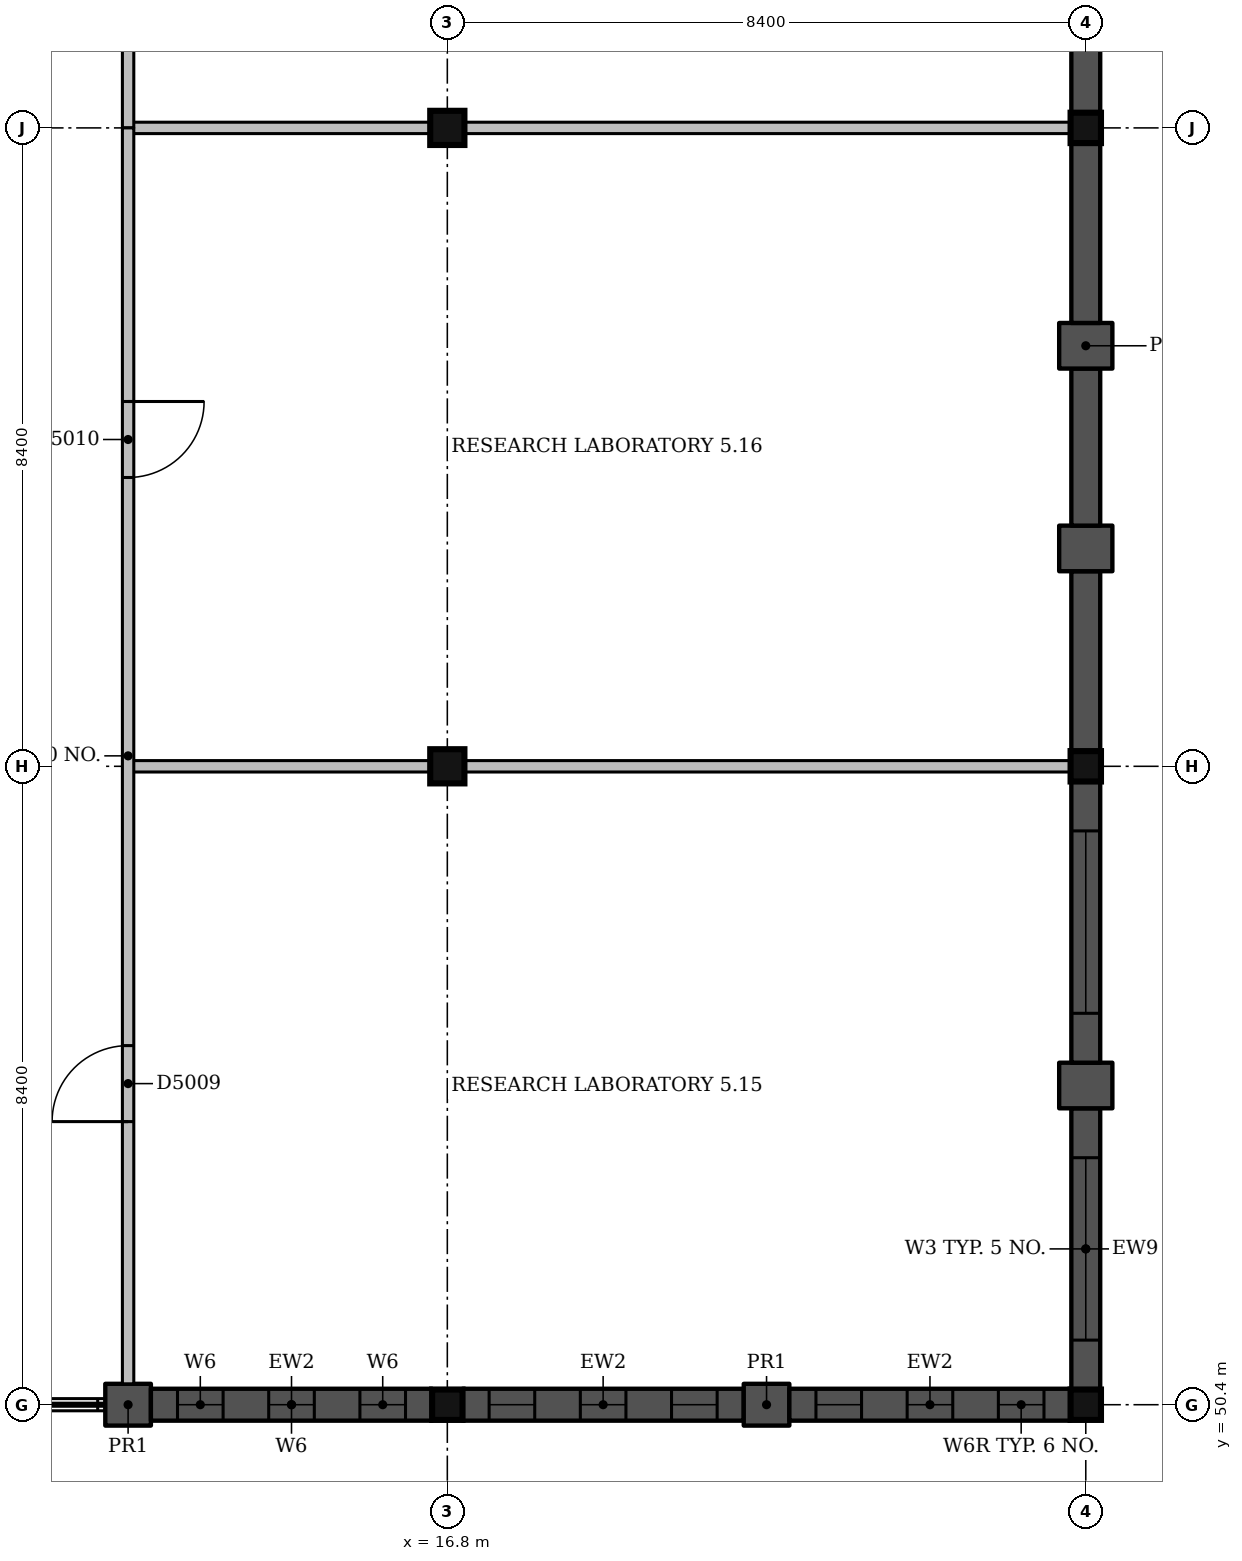
"""IFC4 building model, lengths in metres.
Left out: names, types, materials, properties, quantities, classifications, styles, units other than length and angle.
Written with IfcOpenShell. Run it as: python <this file> out.ifc"""

import sys

from ifc_helpers import new_model, si_unit, direction, frame, frame_2d, origin, origin_2d, place, context, subcontext, project, spatial, rectangle, extrude, element, fill, save


model = new_model("IFC4")
c1 = context("Model", 3, precision=1e-05, world=origin(), true_north=direction((0.0, 1.0)))
c2 = subcontext(c1, "Body", "Model", "MODEL_VIEW")
j1 = project(units=[si_unit("LENGTHUNIT", "METRE"), si_unit("PLANEANGLEUNIT", "RADIAN")], contexts=[c1])
p1 = place(None, origin())
s1 = spatial("IfcSite", under=j1, at=p1, CompositionType="ELEMENT")
p2 = place(p1, origin())
s2 = spatial("IfcBuilding", under=s1, at=p2, CompositionType="ELEMENT")
p3 = place(p2, frame((0.0, 0.0, 22.5)))
s3 = spatial("IfcBuildingStorey", under=s2, at=p3, CompositionType="ELEMENT", Elevation=22.5)
p4 = place(p3, frame((16.8, 50.4, 0.0), z_axis=(0.0, 0.0, 1.0), x_axis=(1.0, 0.0, 0.0)))
e1 = element("IfcColumn", 1, at=p4, inside=s3, PredefinedType="COLUMN", context=c2, shape_type="SweptSolid", body=[
    extrude(rectangle(XDim=0.4, YDim=0.4, at=origin_2d()), origin(), (0.0, 0.0, 1.0), 4.5),
])
for number, where, z_axis, x_axis in (
    (2, (16.8, 58.8, 0.0), (0.0, 0.0, 1.0), (1.0, 0.0, 0.0)),
    (3, (16.8, 67.2, 0.0), (0.0, 0.0, 1.0), (1.0, 0.0, 0.0)),
):
    element("IfcColumn", number, at=place(p3, frame(where, z_axis=z_axis, x_axis=x_axis)), inside=s3, PredefinedType="COLUMN", context=c2, shape_type="SweptSolid", body=[
        extrude(rectangle(XDim=0.45, YDim=0.45, at=origin_2d()), origin(), (0.0, 0.0, 1.0), 4.5),
    ])
for number, where, z_axis, x_axis in (
    (4, (25.2, 50.4, 0.0), (0.0, 0.0, 1.0), (1.0, 0.0, 0.0)),
    (5, (25.2, 58.8, 0.0), (0.0, 0.0, 1.0), (1.0, 0.0, 0.0)),
    (6, (25.2, 67.2, 0.0), (0.0, 0.0, 1.0), (1.0, 0.0, 0.0)),
):
    element("IfcColumn", number, at=place(p3, frame(where, z_axis=z_axis, x_axis=x_axis)), inside=s3, PredefinedType="COLUMN", context=c2, shape_type="SweptSolid", body=[
        extrude(rectangle(XDim=0.4, YDim=0.4, at=origin_2d()), origin(), (0.0, 0.0, 1.0), 4.5),
    ])
p5 = place(p3, frame((25.2, 50.6, 0.0), z_axis=(0.0, 0.0, 1.0), x_axis=(0.0, 1.0, 0.0)))
e7 = element("IfcWall", 7, at=p5, inside=s3, PredefinedType="SOLIDWALL", context=c2, shape_type="SweptSolid", body=[
    extrude(rectangle(XDim=3.7, YDim=0.38, at=frame_2d((1.85, 0.0))), origin(), (0.0, 0.0, 1.0), 4.2),
])
p6 = place(p5, frame((0.65, 0.0, 1.2)))
e8 = element("IfcOpeningElement", 8, at=p6, cuts=e7, PredefinedType="OPENING", context=c2, shape_type="SweptSolid", body=[
    extrude(rectangle(XDim=2.4, YDim=1.5, at=frame_2d((1.2, 0.75))), frame((0.0, 0.2, 0.0), z_axis=(0.0, -1.0, 0.0), x_axis=(1.0, 0.0, 0.0)), (0.0, 0.0, 1.0), 0.4),
])
p7 = place(p3, frame((25.2, 54.3, 0.0), z_axis=(0.0, 0.0, 1.0), x_axis=(0.0, 1.0, 0.0)))
e9 = element("IfcWall", 9, at=p7, inside=s3, PredefinedType="SOLIDWALL", context=c2, shape_type="SweptSolid", body=[
    extrude(rectangle(XDim=0.6, YDim=0.7, at=frame_2d((0.3, 0.0))), origin(), (0.0, 0.0, 1.0), 4.2),
])
p8 = place(p3, frame((25.2, 54.9, 0.0), z_axis=(0.0, 0.0, 1.0), x_axis=(0.0, 1.0, 0.0)))
e10 = element("IfcWall", 10, at=p8, inside=s3, PredefinedType="SOLIDWALL", context=c2, shape_type="SweptSolid", body=[
    extrude(rectangle(XDim=3.7, YDim=0.38, at=frame_2d((1.85, 0.0))), origin(), (0.0, 0.0, 1.0), 4.2),
])
p9 = place(p8, frame((0.65, 0.0, 1.2)))
e11 = element("IfcOpeningElement", 11, at=p9, cuts=e10, PredefinedType="OPENING", context=c2, shape_type="SweptSolid", body=[
    extrude(rectangle(XDim=2.4, YDim=1.5, at=frame_2d((1.2, 0.75))), frame((0.0, 0.2, 0.0), z_axis=(0.0, -1.0, 0.0), x_axis=(1.0, 0.0, 0.0)), (0.0, 0.0, 1.0), 0.4),
])
p10 = place(p3, frame((25.2, 59.0, 0.0), z_axis=(0.0, 0.0, 1.0), x_axis=(0.0, 1.0, 0.0)))
e12 = element("IfcWall", 12, at=p10, inside=s3, PredefinedType="SOLIDWALL", context=c2, shape_type="SweptSolid", body=[
    extrude(rectangle(XDim=2.367, YDim=0.38, at=frame_2d((1.183, 0.0))), origin(), (0.0, 0.0, 1.0), 3.35),
])
p11 = place(p3, frame((25.2, 61.367, 0.0), z_axis=(0.0, 0.0, 1.0), x_axis=(0.0, 1.0, 0.0)))
e13 = element("IfcWall", 13, at=p11, inside=s3, PredefinedType="SOLIDWALL", context=c2, shape_type="SweptSolid", body=[
    extrude(rectangle(XDim=0.6, YDim=0.7, at=frame_2d((0.3, 0.0))), origin(), (0.0, 0.0, 1.0), 3.35),
])
p12 = place(p3, frame((25.2, 61.967, 0.0), z_axis=(0.0, 0.0, 1.0), x_axis=(0.0, 1.0, 0.0)))
e14 = element("IfcWall", 14, at=p12, inside=s3, PredefinedType="SOLIDWALL", context=c2, shape_type="SweptSolid", body=[
    extrude(rectangle(XDim=2.066, YDim=0.38, at=frame_2d((1.033, 0.0))), origin(), (0.0, 0.0, 1.0), 3.35),
])
p13 = place(p3, frame((25.2, 64.033, 0.0), z_axis=(0.0, 0.0, 1.0), x_axis=(0.0, 1.0, 0.0)))
e15 = element("IfcWall", 15, at=p13, inside=s3, PredefinedType="SOLIDWALL", context=c2, shape_type="SweptSolid", body=[
    extrude(rectangle(XDim=0.6, YDim=0.7, at=frame_2d((0.3, 0.0))), origin(), (0.0, 0.0, 1.0), 3.35),
])
p14 = place(p3, frame((25.2, 64.633, 0.0), z_axis=(0.0, 0.0, 1.0), x_axis=(0.0, 1.0, 0.0)))
e16 = element("IfcWall", 16, at=p14, inside=s3, PredefinedType="SOLIDWALL", context=c2, shape_type="SweptSolid", body=[
    extrude(rectangle(XDim=2.367, YDim=0.38, at=frame_2d((1.183, 0.0))), origin(), (0.0, 0.0, 1.0), 3.35),
])
p15 = place(p3, frame((25.2, 67.4, 0.0), z_axis=(0.0, 0.0, 1.0), x_axis=(0.0, 1.0, 0.0)))
e17 = element("IfcWall", 17, at=p15, inside=s3, PredefinedType="SOLIDWALL", context=c2, shape_type="SweptSolid", body=[
    extrude(rectangle(XDim=3.7, YDim=0.38, at=frame_2d((1.85, 0.0))), origin(), (0.0, 0.0, 1.0), 3.35),
])
p16 = place(p15, frame((1.25, 0.0, 0.9)))
e18 = element("IfcOpeningElement", 18, at=p16, cuts=e17, PredefinedType="OPENING", context=c2, shape_type="SweptSolid", body=[
    extrude(rectangle(XDim=1.2, YDim=2.1, at=frame_2d((0.6, 1.05))), frame((0.0, 0.2, 0.0), z_axis=(0.0, -1.0, 0.0), x_axis=(1.0, 0.0, 0.0)), (0.0, 0.0, 1.0), 0.4),
])
p17 = place(p3, frame((12.3, 50.4, 0.0), z_axis=(0.0, 0.0, 1.0), x_axis=(1.0, 0.0, 0.0)))
e19 = element("IfcWall", 19, at=p17, inside=s3, PredefinedType="SOLIDWALL", context=c2, shape_type="SweptSolid", body=[
    extrude(rectangle(XDim=0.6, YDim=0.55, at=frame_2d((0.3, 0.0))), origin(), (0.0, 0.0, 1.0), 4.2),
])
p18 = place(p3, frame((12.9, 50.4, 0.0), z_axis=(0.0, 0.0, 1.0), x_axis=(1.0, 0.0, 0.0)))
e20 = element("IfcWall", 20, at=p18, inside=s3, PredefinedType="SOLIDWALL", context=c2, shape_type="SweptSolid", body=[
    extrude(rectangle(XDim=3.7, YDim=0.42, at=frame_2d((1.85, 0.0))), origin(), (0.0, 0.0, 1.0), 4.2),
])
p19 = place(p18, frame((0.35, 0.0, 1.0)))
e21 = element("IfcOpeningElement", 21, at=p19, cuts=e20, PredefinedType="OPENING", context=c2, shape_type="SweptSolid", body=[
    extrude(rectangle(XDim=0.6, YDim=2.1, at=frame_2d((0.3, 1.05))), frame((0.0, 0.22, 0.0), z_axis=(0.0, -1.0, 0.0), x_axis=(1.0, 0.0, 0.0)), (0.0, 0.0, 1.0), 0.44),
])
p20 = place(p18, frame((1.55, 0.0, 1.0)))
e22 = element("IfcOpeningElement", 22, at=p20, cuts=e20, PredefinedType="OPENING", context=c2, shape_type="SweptSolid", body=[
    extrude(rectangle(XDim=0.6, YDim=2.1, at=frame_2d((0.3, 1.05))), frame((0.0, 0.22, 0.0), z_axis=(0.0, -1.0, 0.0), x_axis=(1.0, 0.0, 0.0)), (0.0, 0.0, 1.0), 0.44),
])
p21 = place(p18, frame((2.75, 0.0, 1.0)))
e23 = element("IfcOpeningElement", 23, at=p21, cuts=e20, PredefinedType="OPENING", context=c2, shape_type="SweptSolid", body=[
    extrude(rectangle(XDim=0.6, YDim=2.1, at=frame_2d((0.3, 1.05))), frame((0.0, 0.22, 0.0), z_axis=(0.0, -1.0, 0.0), x_axis=(1.0, 0.0, 0.0)), (0.0, 0.0, 1.0), 0.44),
])
p22 = place(p3, frame((17.0, 50.4, 0.0), z_axis=(0.0, 0.0, 1.0), x_axis=(1.0, 0.0, 0.0)))
e24 = element("IfcWall", 24, at=p22, inside=s3, PredefinedType="SOLIDWALL", context=c2, shape_type="SweptSolid", body=[
    extrude(rectangle(XDim=3.7, YDim=0.42, at=frame_2d((1.85, 0.0))), origin(), (0.0, 0.0, 1.0), 3.35),
])
p23 = place(p22, frame((0.35, 0.0, 1.0)))
e25 = element("IfcOpeningElement", 25, at=p23, cuts=e24, PredefinedType="OPENING", context=c2, shape_type="SweptSolid", body=[
    extrude(rectangle(XDim=0.6, YDim=1.8, at=frame_2d((0.3, 0.9))), frame((0.0, 0.22, 0.0), z_axis=(0.0, -1.0, 0.0), x_axis=(1.0, 0.0, 0.0)), (0.0, 0.0, 1.0), 0.44),
])
p24 = place(p22, frame((1.55, 0.0, 1.0)))
e26 = element("IfcOpeningElement", 26, at=p24, cuts=e24, PredefinedType="OPENING", context=c2, shape_type="SweptSolid", body=[
    extrude(rectangle(XDim=0.6, YDim=1.8, at=frame_2d((0.3, 0.9))), frame((0.0, 0.22, 0.0), z_axis=(0.0, -1.0, 0.0), x_axis=(1.0, 0.0, 0.0)), (0.0, 0.0, 1.0), 0.44),
])
p25 = place(p22, frame((2.75, 0.0, 1.0)))
e27 = element("IfcOpeningElement", 27, at=p25, cuts=e24, PredefinedType="OPENING", context=c2, shape_type="SweptSolid", body=[
    extrude(rectangle(XDim=0.6, YDim=1.8, at=frame_2d((0.3, 0.9))), frame((0.0, 0.22, 0.0), z_axis=(0.0, -1.0, 0.0), x_axis=(1.0, 0.0, 0.0)), (0.0, 0.0, 1.0), 0.44),
])
p26 = place(p3, frame((20.7, 50.4, 0.0), z_axis=(0.0, 0.0, 1.0), x_axis=(1.0, 0.0, 0.0)))
e28 = element("IfcWall", 28, at=p26, inside=s3, PredefinedType="SOLIDWALL", context=c2, shape_type="SweptSolid", body=[
    extrude(rectangle(XDim=0.6, YDim=0.55, at=frame_2d((0.3, 0.0))), origin(), (0.0, 0.0, 1.0), 3.35),
])
p27 = place(p3, frame((21.3, 50.4, 0.0), z_axis=(0.0, 0.0, 1.0), x_axis=(1.0, 0.0, 0.0)))
e29 = element("IfcWall", 29, at=p27, inside=s3, PredefinedType="SOLIDWALL", context=c2, shape_type="SweptSolid", body=[
    extrude(rectangle(XDim=3.7, YDim=0.42, at=frame_2d((1.85, 0.0))), origin(), (0.0, 0.0, 1.0), 3.35),
])
p28 = place(p27, frame((0.35, 0.0, 1.0)))
e30 = element("IfcOpeningElement", 30, at=p28, cuts=e29, PredefinedType="OPENING", context=c2, shape_type="SweptSolid", body=[
    extrude(rectangle(XDim=0.6, YDim=1.8, at=frame_2d((0.3, 0.9))), frame((0.0, 0.22, 0.0), z_axis=(0.0, -1.0, 0.0), x_axis=(1.0, 0.0, 0.0)), (0.0, 0.0, 1.0), 0.44),
])
p29 = place(p27, frame((1.55, 0.0, 1.0)))
e31 = element("IfcOpeningElement", 31, at=p29, cuts=e29, PredefinedType="OPENING", context=c2, shape_type="SweptSolid", body=[
    extrude(rectangle(XDim=0.6, YDim=1.8, at=frame_2d((0.3, 0.9))), frame((0.0, 0.22, 0.0), z_axis=(0.0, -1.0, 0.0), x_axis=(1.0, 0.0, 0.0)), (0.0, 0.0, 1.0), 0.44),
])
p30 = place(p27, frame((2.75, 0.0, 1.0)))
e32 = element("IfcOpeningElement", 32, at=p30, cuts=e29, PredefinedType="OPENING", context=c2, shape_type="SweptSolid", body=[
    extrude(rectangle(XDim=0.6, YDim=1.8, at=frame_2d((0.3, 0.9))), frame((0.0, 0.22, 0.0), z_axis=(0.0, -1.0, 0.0), x_axis=(1.0, 0.0, 0.0)), (0.0, 0.0, 1.0), 0.44),
])
p31 = place(p3, frame((12.6, 58.8, 0.0), z_axis=(0.0, 0.0, 1.0), x_axis=(1.0, 0.0, 0.0)))
e33 = element("IfcWall", 33, at=p31, inside=s3, PredefinedType="PARTITIONING", context=c2, shape_type="SweptSolid", body=[
    extrude(rectangle(XDim=3.975, YDim=0.15, at=frame_2d((1.987, 0.0))), origin(), (0.0, 0.0, 1.0), 3.4),
])
p32 = place(p3, frame((17.025, 58.8, 0.0), z_axis=(0.0, 0.0, 1.0), x_axis=(1.0, 0.0, 0.0)))
e34 = element("IfcWall", 34, at=p32, inside=s3, PredefinedType="PARTITIONING", context=c2, shape_type="SweptSolid", body=[
    extrude(rectangle(XDim=7.975, YDim=0.15, at=frame_2d((3.988, 0.0))), origin(), (0.0, 0.0, 1.0), 3.35),
])
p33 = place(p3, frame((12.6, 67.2, 0.0), z_axis=(0.0, 0.0, 1.0), x_axis=(1.0, 0.0, 0.0)))
e35 = element("IfcWall", 35, at=p33, inside=s3, PredefinedType="PARTITIONING", context=c2, shape_type="SweptSolid", body=[
    extrude(rectangle(XDim=3.975, YDim=0.15, at=frame_2d((1.987, 0.0))), origin(), (0.0, 0.0, 1.0), 3.4),
])
p34 = place(p3, frame((17.025, 67.2, 0.0), z_axis=(0.0, 0.0, 1.0), x_axis=(1.0, 0.0, 0.0)))
e36 = element("IfcWall", 36, at=p34, inside=s3, PredefinedType="PARTITIONING", context=c2, shape_type="SweptSolid", body=[
    extrude(rectangle(XDim=7.975, YDim=0.15, at=frame_2d((3.988, 0.0))), origin(), (0.0, 0.0, 1.0), 3.35),
])
p35 = place(p3, frame((12.6, 67.2, 0.0), z_axis=(0.0, 0.0, 1.0), x_axis=(0.0, 1.0, 0.0)))
e37 = element("IfcWall", 37, at=p35, inside=s3, PredefinedType="PARTITIONING", context=c2, shape_type="SweptSolid", body=[
    extrude(rectangle(XDim=8.4, YDim=0.15, at=frame_2d((4.2, 0.0))), origin(), (0.0, 0.0, 1.0), 3.4),
])
p36 = place(p35, frame((1.7, 0.0, 0.0)))
e38 = element("IfcOpeningElement", 38, at=p36, cuts=e37, PredefinedType="OPENING", context=c2, shape_type="SweptSolid", body=[
    extrude(rectangle(XDim=0.9, YDim=2.1, at=frame_2d((0.45, 1.05))), frame((0.0, 0.085, 0.0), z_axis=(0.0, -1.0, 0.0), x_axis=(1.0, 0.0, 0.0)), (0.0, 0.0, 1.0), 0.17),
])
p37 = place(p35, frame((5.9, 0.0, 0.0)))
e39 = element("IfcOpeningElement", 39, at=p37, cuts=e37, PredefinedType="OPENING", context=c2, shape_type="SweptSolid", body=[
    extrude(rectangle(XDim=0.9, YDim=2.1, at=frame_2d((0.45, 1.05))), frame((0.0, 0.085, 0.0), z_axis=(0.0, -1.0, 0.0), x_axis=(1.0, 0.0, 0.0)), (0.0, 0.0, 1.0), 0.17),
])
p38 = place(p3, frame((12.6, 50.675, 0.0), z_axis=(0.0, 0.0, 1.0), x_axis=(0.0, 1.0, 0.0)))
e40 = element("IfcWall", 40, at=p38, inside=s3, PredefinedType="PARTITIONING", context=c2, shape_type="SweptSolid", body=[
    extrude(rectangle(XDim=16.525, YDim=0.15, at=frame_2d((8.262, 0.0))), origin(), (0.0, 0.0, 1.0), 3.4),
])
p39 = place(p38, frame((3.45, 0.0, 0.0)))
e41 = element("IfcOpeningElement", 41, at=p39, cuts=e40, PredefinedType="OPENING", context=c2, shape_type="SweptSolid", body=[
    extrude(rectangle(XDim=1.0, YDim=2.1, at=frame_2d((0.5, 1.05))), frame((0.0, 0.085, 0.0), z_axis=(0.0, -1.0, 0.0), x_axis=(1.0, 0.0, 0.0)), (0.0, 0.0, 1.0), 0.17),
])
p40 = place(p38, frame((11.925, 0.0, 0.0)))
e42 = element("IfcOpeningElement", 42, at=p40, cuts=e40, PredefinedType="OPENING", context=c2, shape_type="SweptSolid", body=[
    extrude(rectangle(XDim=1.0, YDim=2.1, at=frame_2d((0.5, 1.05))), frame((0.0, 0.085, 0.0), z_axis=(0.0, -1.0, 0.0), x_axis=(1.0, 0.0, 0.0)), (0.0, 0.0, 1.0), 0.17),
])
p41 = place(p6, origin())
e43 = element("IfcWindow", 43, at=p41, inside=s3, PartitioningType="SINGLE_PANEL", PredefinedType="WINDOW", context=c2, shape_type="SweptSolid", body=[
    extrude(rectangle(XDim=2.4, YDim=1.5, at=frame_2d((1.2, 0.75))), frame((0.0, 0.15, 0.0), z_axis=(0.0, -1.0, 0.0), x_axis=(1.0, 0.0, 0.0)), (0.0, 0.0, 1.0), 0.06),
])
fill(e8, e43)
p42 = place(p9, origin())
e44 = element("IfcWindow", 44, at=p42, inside=s3, PartitioningType="SINGLE_PANEL", PredefinedType="WINDOW", context=c2, shape_type="SweptSolid", body=[
    extrude(rectangle(XDim=2.4, YDim=1.5, at=frame_2d((1.2, 0.75))), frame((0.0, 0.15, 0.0), z_axis=(0.0, -1.0, 0.0), x_axis=(1.0, 0.0, 0.0)), (0.0, 0.0, 1.0), 0.06),
])
fill(e11, e44)
p43 = place(p19, origin())
e45 = element("IfcWindow", 45, at=p43, inside=s3, PartitioningType="SINGLE_PANEL", PredefinedType="WINDOW", context=c2, shape_type="SweptSolid", body=[
    extrude(rectangle(XDim=0.6, YDim=2.1, at=frame_2d((0.3, 1.05))), frame((0.0, 0.15, 0.0), z_axis=(0.0, -1.0, 0.0), x_axis=(1.0, 0.0, 0.0)), (0.0, 0.0, 1.0), 0.06),
])
fill(e21, e45)
p44 = place(p20, origin())
e46 = element("IfcWindow", 46, at=p44, inside=s3, PartitioningType="SINGLE_PANEL", PredefinedType="WINDOW", context=c2, shape_type="SweptSolid", body=[
    extrude(rectangle(XDim=0.6, YDim=2.1, at=frame_2d((0.3, 1.05))), frame((0.0, 0.15, 0.0), z_axis=(0.0, -1.0, 0.0), x_axis=(1.0, 0.0, 0.0)), (0.0, 0.0, 1.0), 0.06),
])
fill(e22, e46)
p45 = place(p21, origin())
e47 = element("IfcWindow", 47, at=p45, inside=s3, PartitioningType="SINGLE_PANEL", PredefinedType="WINDOW", context=c2, shape_type="SweptSolid", body=[
    extrude(rectangle(XDim=0.6, YDim=2.1, at=frame_2d((0.3, 1.05))), frame((0.0, 0.15, 0.0), z_axis=(0.0, -1.0, 0.0), x_axis=(1.0, 0.0, 0.0)), (0.0, 0.0, 1.0), 0.06),
])
fill(e23, e47)
p46 = place(p23, origin())
e48 = element("IfcWindow", 48, at=p46, inside=s3, PartitioningType="SINGLE_PANEL", PredefinedType="WINDOW", context=c2, shape_type="SweptSolid", body=[
    extrude(rectangle(XDim=0.6, YDim=1.8, at=frame_2d((0.3, 0.9))), frame((0.0, 0.15, 0.0), z_axis=(0.0, -1.0, 0.0), x_axis=(1.0, 0.0, 0.0)), (0.0, 0.0, 1.0), 0.06),
])
fill(e25, e48)
p47 = place(p24, origin())
e49 = element("IfcWindow", 49, at=p47, inside=s3, PartitioningType="SINGLE_PANEL", PredefinedType="WINDOW", context=c2, shape_type="SweptSolid", body=[
    extrude(rectangle(XDim=0.6, YDim=1.8, at=frame_2d((0.3, 0.9))), frame((0.0, 0.15, 0.0), z_axis=(0.0, -1.0, 0.0), x_axis=(1.0, 0.0, 0.0)), (0.0, 0.0, 1.0), 0.06),
])
fill(e26, e49)
p48 = place(p25, origin())
e50 = element("IfcWindow", 50, at=p48, inside=s3, PartitioningType="SINGLE_PANEL", PredefinedType="WINDOW", context=c2, shape_type="SweptSolid", body=[
    extrude(rectangle(XDim=0.6, YDim=1.8, at=frame_2d((0.3, 0.9))), frame((0.0, 0.15, 0.0), z_axis=(0.0, -1.0, 0.0), x_axis=(1.0, 0.0, 0.0)), (0.0, 0.0, 1.0), 0.06),
])
fill(e27, e50)
p49 = place(p28, origin())
e51 = element("IfcWindow", 51, at=p49, inside=s3, PartitioningType="SINGLE_PANEL", PredefinedType="WINDOW", context=c2, shape_type="SweptSolid", body=[
    extrude(rectangle(XDim=0.6, YDim=1.8, at=frame_2d((0.3, 0.9))), frame((0.0, 0.15, 0.0), z_axis=(0.0, -1.0, 0.0), x_axis=(1.0, 0.0, 0.0)), (0.0, 0.0, 1.0), 0.06),
])
fill(e30, e51)
p50 = place(p29, origin())
e52 = element("IfcWindow", 52, at=p50, inside=s3, PartitioningType="SINGLE_PANEL", PredefinedType="WINDOW", context=c2, shape_type="SweptSolid", body=[
    extrude(rectangle(XDim=0.6, YDim=1.8, at=frame_2d((0.3, 0.9))), frame((0.0, 0.15, 0.0), z_axis=(0.0, -1.0, 0.0), x_axis=(1.0, 0.0, 0.0)), (0.0, 0.0, 1.0), 0.06),
])
fill(e31, e52)
p51 = place(p30, origin())
e53 = element("IfcWindow", 53, at=p51, inside=s3, PartitioningType="SINGLE_PANEL", PredefinedType="WINDOW", context=c2, shape_type="SweptSolid", body=[
    extrude(rectangle(XDim=0.6, YDim=1.8, at=frame_2d((0.3, 0.9))), frame((0.0, 0.15, 0.0), z_axis=(0.0, -1.0, 0.0), x_axis=(1.0, 0.0, 0.0)), (0.0, 0.0, 1.0), 0.06),
])
fill(e32, e53)
p52 = place(p39, origin())
e54 = element("IfcDoor", 54, at=p52, inside=s3, OperationType="SINGLE_SWING_LEFT", PredefinedType="DOOR", context=c2, shape_type="SweptSolid", body=[
    extrude(rectangle(XDim=1.0, YDim=2.1, at=frame_2d((0.5, 1.05))), frame((0.0, 0.025, 0.0), z_axis=(0.0, -1.0, 0.0), x_axis=(1.0, 0.0, 0.0)), (0.0, 0.0, 1.0), 0.05),
])
fill(e41, e54)
p53 = place(p40, origin())
e55 = element("IfcDoor", 55, at=p53, inside=s3, OperationType="SINGLE_SWING_RIGHT", PredefinedType="DOOR", context=c2, shape_type="SweptSolid", body=[
    extrude(rectangle(XDim=1.0, YDim=2.1, at=frame_2d((0.5, 1.05))), frame((0.0, 0.025, 0.0), z_axis=(0.0, -1.0, 0.0), x_axis=(1.0, 0.0, 0.0)), (0.0, 0.0, 1.0), 0.05),
])
fill(e42, e55)
save(model, sys.argv[1])
